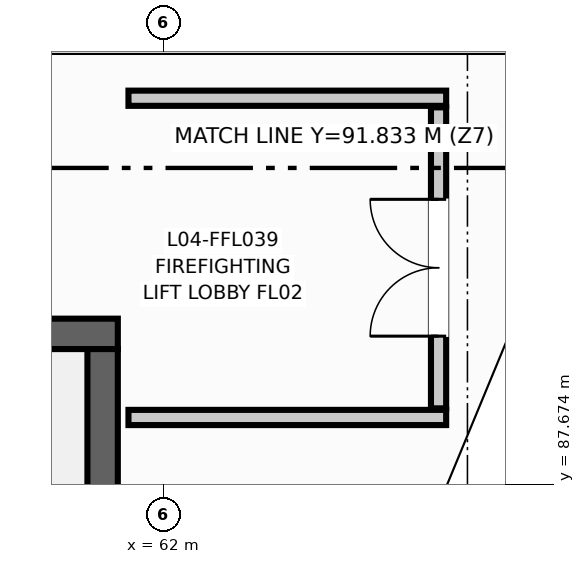
"""IFC4 building model, lengths in metres.
Left out: names, types, materials, properties, quantities, classifications, styles, units other than length and angle.
Written with IfcOpenShell. Run it as: python <this file> out.ifc"""

import sys

from ifc_helpers import new_model, si_unit, direction, frame, frame_2d, origin, place, context, subcontext, project, spatial, rectangle, extrude, element, fill, save


model = new_model("IFC4")
c1 = context("Model", 3, precision=1e-05, world=origin(), true_north=direction((0.0, 1.0)))
c2 = subcontext(c1, "Body", "Model", "MODEL_VIEW")
j1 = project(units=[si_unit("LENGTHUNIT", "METRE"), si_unit("PLANEANGLEUNIT", "RADIAN")], contexts=[c1])
p1 = place(None, origin())
s1 = spatial("IfcSite", under=j1, at=p1, CompositionType="ELEMENT")
p2 = place(p1, origin())
s2 = spatial("IfcBuilding", under=s1, at=p2, CompositionType="ELEMENT")
p3 = place(p2, frame((0.0, 0.0, 18.0)))
s3 = spatial("IfcBuildingStorey", under=s2, at=p3, CompositionType="ELEMENT", Elevation=18.0)
p4 = place(p3, frame((55.6, 89.65, 0.0), z_axis=(0.0, 0.0, 1.0), x_axis=(1.0, 0.0, 0.0)))
e1 = element("IfcWall", 1, at=p4, inside=s3, PredefinedType="SHEAR", context=c2, shape_type="SweptSolid", body=[
    extrude(rectangle(XDim=5.8, YDim=0.4, at=frame_2d((2.9, 0.0))), origin(), (0.0, 0.0, 1.0), 4.25),
])
p5 = place(p3, frame((61.2, 80.55, 0.0), z_axis=(0.0, 0.0, 1.0), x_axis=(0.0, 1.0, 0.0)))
e2 = element("IfcWall", 2, at=p5, inside=s3, PredefinedType="SHEAR", context=c2, shape_type="SweptSolid", body=[
    extrude(rectangle(XDim=8.9, YDim=0.4, at=frame_2d((4.45, 0.0))), origin(), (0.0, 0.0, 1.0), 4.25),
])
p6 = place(p5, frame((0.4, 0.0, 0.0)))
e3 = element("IfcOpeningElement", 3, at=p6, cuts=e2, PredefinedType="OPENING", context=c2, shape_type="SweptSolid", body=[
    extrude(rectangle(XDim=1.2, YDim=2.2, at=frame_2d((0.6, 1.1))), frame((0.0, 0.21, 0.0), z_axis=(0.0, -1.0, 0.0), x_axis=(1.0, 0.0, 0.0)), (0.0, 0.0, 1.0), 0.42),
])
for number, where, z_axis, x_axis in (
    (4, (61.54, 88.55, 0.0), (0.0, 0.0, 1.0), (1.0, 0.0, 0.0)),
    (5, (61.54, 92.75, 0.0), (0.0, 0.0, 1.0), (1.0, 0.0, 0.0)),
):
    element("IfcWall", number, at=place(p3, frame(where, z_axis=z_axis, x_axis=x_axis)), inside=s3, PredefinedType="PARTITIONING", context=c2, shape_type="SweptSolid", body=[
        extrude(rectangle(XDim=4.18, YDim=0.2, at=frame_2d((2.09, 0.0))), origin(), (0.0, 0.0, 1.0), 3.22),
    ])
p7 = place(p3, frame((65.62, 88.67, 0.0), z_axis=(0.0, 0.0, 1.0), x_axis=(0.0, 1.0, 0.0)))
e6 = element("IfcWall", 6, at=p7, inside=s3, PredefinedType="PARTITIONING", context=c2, shape_type="SweptSolid", body=[
    extrude(rectangle(XDim=3.96, YDim=0.2, at=frame_2d((1.98, 0.0))), origin(), (0.0, 0.0, 1.0), 3.22),
])
p8 = place(p7, frame((0.95, 0.0, 0.0)))
e7 = element("IfcOpeningElement", 7, at=p8, cuts=e6, PredefinedType="OPENING", context=c2, shape_type="SweptSolid", body=[
    extrude(rectangle(XDim=1.8, YDim=2.2, at=frame_2d((0.9, 1.1))), frame((0.0, 0.11, 0.0), z_axis=(0.0, -1.0, 0.0), x_axis=(1.0, 0.0, 0.0)), (0.0, 0.0, 1.0), 0.22),
])
p9 = place(p8, origin())
e8 = element("IfcDoor", 8, at=p9, inside=s3, OperationType="DOUBLE_DOOR_SINGLE_SWING", PredefinedType="DOOR", context=c2, shape_type="SweptSolid", body=[
    extrude(rectangle(XDim=1.8, YDim=2.2, at=frame_2d((0.9, 1.1))), frame((0.0, 0.025, 0.0), z_axis=(0.0, -1.0, 0.0), x_axis=(1.0, 0.0, 0.0)), (0.0, 0.0, 1.0), 0.05),
])
fill(e7, e8)
save(model, sys.argv[1])
